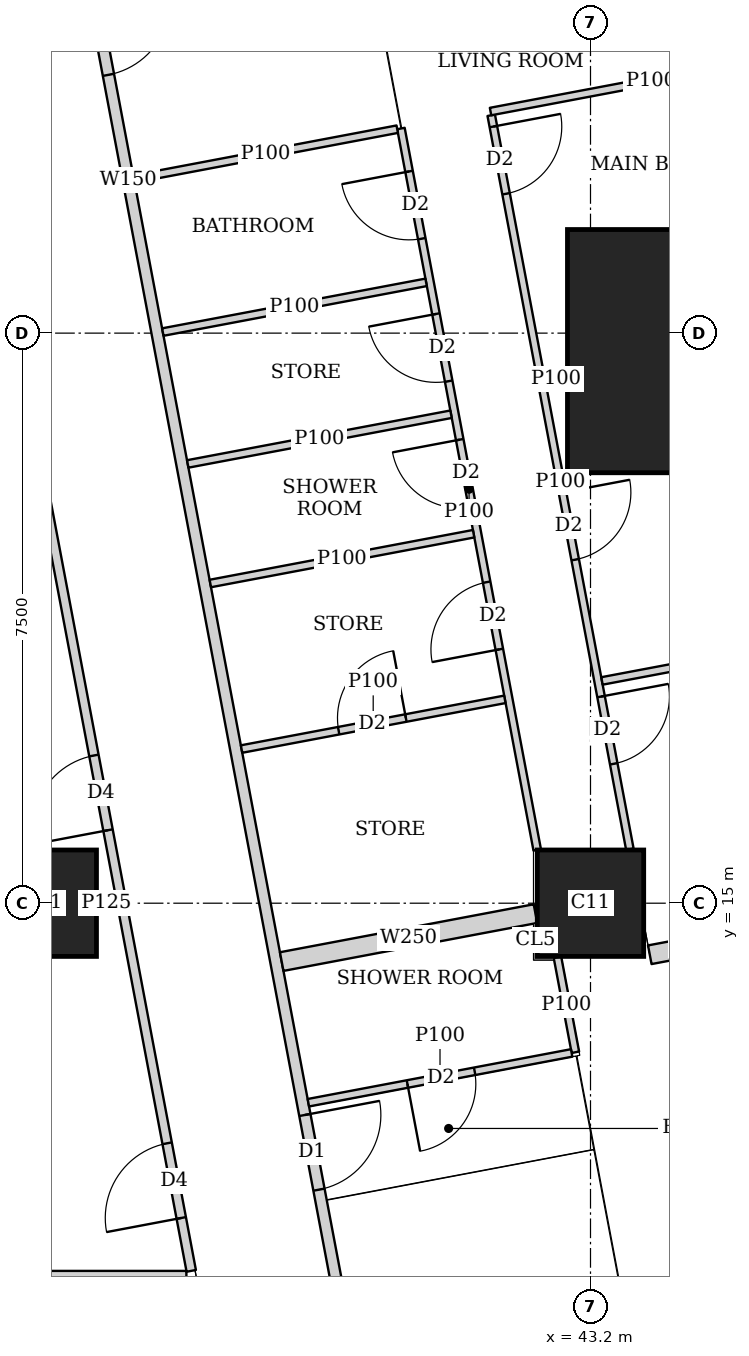
"""IFC4 building model, lengths in metres.
Left out: names, types, materials, properties, quantities, classifications, styles, units other than length and angle.
Written with IfcOpenShell. Run it as: python <this file> out.ifc"""

import sys

from ifc_helpers import new_model, si_unit, direction, frame, frame_2d, origin, origin_2d, place, context, subcontext, project, spatial, rectangle, extrude, element, fill, save


model = new_model("IFC4")
c1 = context("Model", 3, precision=1e-05, world=origin(), true_north=direction((0.0, 1.0)))
c2 = subcontext(c1, "Body", "Model", "MODEL_VIEW")
j1 = project(units=[si_unit("LENGTHUNIT", "METRE"), si_unit("PLANEANGLEUNIT", "RADIAN")], contexts=[c1])
p1 = place(None, origin())
s1 = spatial("IfcSite", under=j1, at=p1, CompositionType="ELEMENT")
p2 = place(p1, origin())
s2 = spatial("IfcBuilding", under=s1, at=p2, CompositionType="ELEMENT")
p3 = place(p2, frame((0.0, 0.0, 277.85)))
s3 = spatial("IfcBuildingStorey", under=s2, at=p3, CompositionType="ELEMENT", Elevation=277.85)
for number, where, z_axis, x_axis in (
    (1, (36.0, 15.0, 0.0), (0.0, 0.0, 1.0), (1.0, 0.0, 0.0)),
    (2, (43.2, 15.0, 0.0), (0.0, 0.0, 1.0), (1.0, 0.0, 0.0)),
):
    element("IfcColumn", number, at=place(p3, frame(where, z_axis=z_axis, x_axis=x_axis)), inside=s3, PredefinedType="COLUMN", context=c2, shape_type="SweptSolid", body=[
        extrude(rectangle(XDim=1.4, YDim=1.4, at=origin_2d()), origin(), (0.0, 0.0, 1.0), 3.75),
    ])
p4 = place(p3, frame((44.697, 22.263, 0.0), z_axis=(0.0, 0.0, 1.0), x_axis=(1.0, 0.0, 0.0)))
e3 = element("IfcColumn", 3, at=p4, inside=s3, PredefinedType="COLUMN", context=c2, shape_type="SweptSolid", body=[
    extrude(rectangle(XDim=3.6, YDim=3.2, at=origin_2d()), origin(), (0.0, 0.0, 1.0), 3.75),
])
p5 = place(p3, frame((49.684, 7.832, 0.0), z_axis=(0.0, 0.0, 1.0), x_axis=(-0.185616669694, 0.982622232565, 0.0)))
e4 = element("IfcWall", 4, at=p5, inside=s3, PredefinedType="SOLIDWALL", context=c2, shape_type="SweptSolid", body=[
    extrude(rectangle(XDim=36.0, YDim=0.2, at=frame_2d((18.0, 0.0))), origin(), (0.0, 0.0, 1.0), 3.5),
])
p6 = place(p5, frame((2.518, 0.0, 0.9)))
e5 = element("IfcOpeningElement", 5, at=p6, cuts=e4, PredefinedType="OPENING", context=c2, shape_type="SweptSolid", body=[
    extrude(rectangle(XDim=2.4, YDim=1.5, at=frame_2d((1.2, 0.75))), frame((0.0, 0.11, 0.0), z_axis=(0.0, -1.0, 0.0), x_axis=(1.0, 0.0, 0.0)), (0.0, 0.0, 1.0), 0.22),
])
p7 = place(p5, frame((8.444, 0.0, 0.9)))
e6 = element("IfcOpeningElement", 6, at=p7, cuts=e4, PredefinedType="OPENING", context=c2, shape_type="SweptSolid", body=[
    extrude(rectangle(XDim=1.8, YDim=1.5, at=frame_2d((0.9, 0.75))), frame((0.0, 0.11, 0.0), z_axis=(0.0, -1.0, 0.0), x_axis=(1.0, 0.0, 0.0)), (0.0, 0.0, 1.0), 0.22),
])
p8 = place(p5, frame((12.261, 0.0, 0.9)))
e7 = element("IfcOpeningElement", 7, at=p8, cuts=e4, PredefinedType="OPENING", context=c2, shape_type="SweptSolid", body=[
    extrude(rectangle(XDim=1.8, YDim=1.5, at=frame_2d((0.9, 0.75))), frame((0.0, 0.11, 0.0), z_axis=(0.0, -1.0, 0.0), x_axis=(1.0, 0.0, 0.0)), (0.0, 0.0, 1.0), 0.22),
])
p9 = place(p5, frame((16.078, 0.0, 0.9)))
e8 = element("IfcOpeningElement", 8, at=p9, cuts=e4, PredefinedType="OPENING", context=c2, shape_type="SweptSolid", body=[
    extrude(rectangle(XDim=1.8, YDim=1.5, at=frame_2d((0.9, 0.75))), frame((0.0, 0.11, 0.0), z_axis=(0.0, -1.0, 0.0), x_axis=(1.0, 0.0, 0.0)), (0.0, 0.0, 1.0), 0.22),
])
p10 = place(p5, frame((19.894, 0.0, 0.9)))
e9 = element("IfcOpeningElement", 9, at=p10, cuts=e4, PredefinedType="OPENING", context=c2, shape_type="SweptSolid", body=[
    extrude(rectangle(XDim=1.8, YDim=1.5, at=frame_2d((0.9, 0.75))), frame((0.0, 0.11, 0.0), z_axis=(0.0, -1.0, 0.0), x_axis=(1.0, 0.0, 0.0)), (0.0, 0.0, 1.0), 0.22),
])
p11 = place(p5, frame((23.71, 0.0, 0.9)))
e10 = element("IfcOpeningElement", 10, at=p11, cuts=e4, PredefinedType="OPENING", context=c2, shape_type="SweptSolid", body=[
    extrude(rectangle(XDim=1.8, YDim=1.5, at=frame_2d((0.9, 0.75))), frame((0.0, 0.11, 0.0), z_axis=(0.0, -1.0, 0.0), x_axis=(1.0, 0.0, 0.0)), (0.0, 0.0, 1.0), 0.22),
])
p12 = place(p5, frame((27.526, 0.0, 0.9)))
e11 = element("IfcOpeningElement", 11, at=p12, cuts=e4, PredefinedType="OPENING", context=c2, shape_type="SweptSolid", body=[
    extrude(rectangle(XDim=1.8, YDim=1.5, at=frame_2d((0.9, 0.75))), frame((0.0, 0.11, 0.0), z_axis=(0.0, -1.0, 0.0), x_axis=(1.0, 0.0, 0.0)), (0.0, 0.0, 1.0), 0.22),
])
p13 = place(p5, frame((32.046, 0.0, 0.9)))
e12 = element("IfcOpeningElement", 12, at=p13, cuts=e4, PredefinedType="OPENING", context=c2, shape_type="SweptSolid", body=[
    extrude(rectangle(XDim=1.8, YDim=1.5, at=frame_2d((0.9, 0.75))), frame((0.0, 0.11, 0.0), z_axis=(0.0, -1.0, 0.0), x_axis=(1.0, 0.0, 0.0)), (0.0, 0.0, 1.0), 0.22),
])
p14 = place(p3, frame((33.781, 42.186, 0.0), z_axis=(0.0, 0.0, 1.0), x_axis=(0.185593518645, -0.9826266055, 0.0)))
e13 = element("IfcWall", 13, at=p14, inside=s3, PredefinedType="SOLIDWALL", context=c2, shape_type="SweptSolid", body=[
    extrude(rectangle(XDim=35.961, YDim=0.15, at=frame_2d((17.98, 0.0))), origin(), (0.0, 0.0, 1.0), 2.5),
])
p15 = place(p14, frame((11.76, 0.0, 0.0)))
e14 = element("IfcOpeningElement", 14, at=p15, cuts=e13, PredefinedType="OPENING", context=c2, shape_type="SweptSolid", body=[
    extrude(rectangle(XDim=1.0, YDim=2.1, at=frame_2d((0.5, 1.05))), frame((0.0, 0.085, 0.0), z_axis=(0.0, -1.0, 0.0), x_axis=(1.0, 0.0, 0.0)), (0.0, 0.0, 1.0), 0.17),
])
p16 = place(p14, frame((15.576, 0.0, 0.0)))
e15 = element("IfcOpeningElement", 15, at=p16, cuts=e13, PredefinedType="OPENING", context=c2, shape_type="SweptSolid", body=[
    extrude(rectangle(XDim=1.0, YDim=2.1, at=frame_2d((0.5, 1.05))), frame((0.0, 0.085, 0.0), z_axis=(0.0, -1.0, 0.0), x_axis=(1.0, 0.0, 0.0)), (0.0, 0.0, 1.0), 0.17),
])
p17 = place(p14, frame((30.502, 0.0, 0.0)))
e16 = element("IfcOpeningElement", 16, at=p17, cuts=e13, PredefinedType="OPENING", context=c2, shape_type="SweptSolid", body=[
    extrude(rectangle(XDim=1.0, YDim=2.1, at=frame_2d((0.5, 1.05))), frame((0.0, 0.085, 0.0), z_axis=(0.0, -1.0, 0.0), x_axis=(1.0, 0.0, 0.0)), (0.0, 0.0, 1.0), 0.17),
])
p18 = place(p3, frame((41.894, 25.366, 0.0), z_axis=(0.0, 0.0, 1.0), x_axis=(0.185612905165, -0.982622943675, 0.0)))
e17 = element("IfcWall", 17, at=p18, inside=s3, PredefinedType="PARTITIONING", context=c2, shape_type="SweptSolid", body=[
    extrude(rectangle(XDim=9.827, YDim=0.1, at=frame_2d((4.913, 0.0))), origin(), (0.0, 0.0, 1.0), 2.5),
])
p19 = place(p18, frame((0.151, 0.0, 0.0)))
e18 = element("IfcOpeningElement", 18, at=p19, cuts=e17, PredefinedType="OPENING", context=c2, shape_type="SweptSolid", body=[
    extrude(rectangle(XDim=0.9, YDim=2.1, at=frame_2d((0.45, 1.05))), frame((0.0, 0.06, 0.0), z_axis=(0.0, -1.0, 0.0), x_axis=(1.0, 0.0, 0.0)), (0.0, 0.0, 1.0), 0.12),
])
p20 = place(p18, frame((5.05, 0.0, 0.0)))
e19 = element("IfcOpeningElement", 19, at=p20, cuts=e17, PredefinedType="OPENING", context=c2, shape_type="SweptSolid", body=[
    extrude(rectangle(XDim=0.9, YDim=2.1, at=frame_2d((0.45, 1.05))), frame((0.0, 0.06, 0.0), z_axis=(0.0, -1.0, 0.0), x_axis=(1.0, 0.0, 0.0)), (0.0, 0.0, 1.0), 0.12),
])
p21 = place(p18, frame((7.783, 0.0, 0.0)))
e20 = element("IfcOpeningElement", 20, at=p21, cuts=e17, PredefinedType="OPENING", context=c2, shape_type="SweptSolid", body=[
    extrude(rectangle(XDim=0.9, YDim=2.1, at=frame_2d((0.45, 1.05))), frame((0.0, 0.06, 0.0), z_axis=(0.0, -1.0, 0.0), x_axis=(1.0, 0.0, 0.0)), (0.0, 0.0, 1.0), 0.12),
])
p22 = place(p3, frame((40.706, 25.192, 0.0), z_axis=(0.0, 0.0, 1.0), x_axis=(0.185629824463, -0.982619747547, 0.0)))
e21 = element("IfcWall", 21, at=p22, inside=s3, PredefinedType="PARTITIONING", context=c2, shape_type="SweptSolid", body=[
    extrude(rectangle(XDim=9.659, YDim=0.1, at=frame_2d((4.83, 0.0))), origin(), (0.0, 0.0, 1.0), 2.5),
])
p23 = place(p22, frame((0.575, 0.0, 0.0)))
e22 = element("IfcOpeningElement", 22, at=p23, cuts=e21, PredefinedType="OPENING", context=c2, shape_type="SweptSolid", body=[
    extrude(rectangle(XDim=0.9, YDim=2.1, at=frame_2d((0.45, 1.05))), frame((0.0, 0.06, 0.0), z_axis=(0.0, -1.0, 0.0), x_axis=(1.0, 0.0, 0.0)), (0.0, 0.0, 1.0), 0.12),
])
p24 = place(p22, frame((4.166, 0.0, 0.0)))
e23 = element("IfcOpeningElement", 23, at=p24, cuts=e21, PredefinedType="OPENING", context=c2, shape_type="SweptSolid", body=[
    extrude(rectangle(XDim=0.9, YDim=2.1, at=frame_2d((0.45, 1.05))), frame((0.0, 0.06, 0.0), z_axis=(0.0, -1.0, 0.0), x_axis=(1.0, 0.0, 0.0)), (0.0, 0.0, 1.0), 0.12),
])
p25 = place(p22, frame((2.483, 0.0, 0.0)))
e24 = element("IfcOpeningElement", 24, at=p25, cuts=e21, PredefinedType="OPENING", context=c2, shape_type="SweptSolid", body=[
    extrude(rectangle(XDim=0.9, YDim=2.1, at=frame_2d((0.45, 1.05))), frame((0.0, 0.06, 0.0), z_axis=(0.0, -1.0, 0.0), x_axis=(1.0, 0.0, 0.0)), (0.0, 0.0, 1.0), 0.12),
])
p26 = place(p22, frame((6.074, 0.0, 0.0)))
e25 = element("IfcOpeningElement", 25, at=p26, cuts=e21, PredefinedType="OPENING", context=c2, shape_type="SweptSolid", body=[
    extrude(rectangle(XDim=0.9, YDim=2.1, at=frame_2d((0.45, 1.05))), frame((0.0, 0.06, 0.0), z_axis=(0.0, -1.0, 0.0), x_axis=(1.0, 0.0, 0.0)), (0.0, 0.0, 1.0), 0.12),
])
p27 = place(p3, frame((46.11, 26.213, 0.0), z_axis=(0.0, 0.0, 1.0), x_axis=(-0.982633535512, -0.185556823879, 0.0)))
e26 = element("IfcWall", 26, at=p27, inside=s3, PredefinedType="PARTITIONING", context=c2, shape_type="SweptSolid", body=[
    extrude(rectangle(XDim=4.3, YDim=0.1, at=frame_2d((2.15, 0.0))), origin(), (0.0, 0.0, 1.0), 2.5),
])
p28 = place(p3, frame((42.887, 21.921, 0.0), z_axis=(0.0, 0.0, 1.0), x_axis=(-0.982688058078, -0.185267861514, 0.0)))
e27 = element("IfcWall", 27, at=p28, inside=s3, PredefinedType="PARTITIONING", context=c2, shape_type="SweptSolid", body=[
    extrude(rectangle(XDim=0.286, YDim=0.1, at=frame_2d((0.143, 0.0))), origin(), (0.0, 0.0, 1.0), 2.5),
])
p29 = place(p3, frame((47.527, 18.712, 0.0), z_axis=(0.0, 0.0, 1.0), x_axis=(-0.982665405803, -0.185387972203, 0.0)))
e28 = element("IfcWall", 28, at=p29, inside=s3, PredefinedType="PARTITIONING", context=c2, shape_type="SweptSolid", body=[
    extrude(rectangle(XDim=4.25, YDim=0.1, at=frame_2d((2.125, 0.0))), origin(), (0.0, 0.0, 1.0), 2.5),
])
p30 = place(p3, frame((40.657, 25.183, 0.0), z_axis=(0.0, 0.0, 1.0), x_axis=(-0.982585626838, -0.185810349366, 0.0)))
e29 = element("IfcWall", 29, at=p30, inside=s3, PredefinedType="PARTITIONING", context=c2, shape_type="SweptSolid", body=[
    extrude(rectangle(XDim=3.525, YDim=0.1, at=frame_2d((1.763, 0.0))), origin(), (0.0, 0.0, 1.0), 3.5),
])
p31 = place(p3, frame((41.365, 21.433, 0.0), z_axis=(0.0, 0.0, 1.0), x_axis=(-0.982638553676, -0.185530247748, 0.0)))
e30 = element("IfcWall", 30, at=p31, inside=s3, PredefinedType="PARTITIONING", context=c2, shape_type="SweptSolid", body=[
    extrude(rectangle(XDim=3.525, YDim=0.1, at=frame_2d((1.763, 0.0))), origin(), (0.0, 0.0, 1.0), 3.5),
])
p32 = place(p3, frame((42.073, 17.682, 0.0), z_axis=(0.0, 0.0, 1.0), x_axis=(-0.98265117712, -0.185463376723, 0.0)))
e31 = element("IfcWall", 31, at=p32, inside=s3, PredefinedType="PARTITIONING", context=c2, shape_type="SweptSolid", body=[
    extrude(rectangle(XDim=3.525, YDim=0.1, at=frame_2d((1.763, 0.0))), origin(), (0.0, 0.0, 1.0), 3.5),
])
p33 = place(p32, frame((1.325, 0.0, 0.0)))
e32 = element("IfcOpeningElement", 32, at=p33, cuts=e31, PredefinedType="OPENING", context=c2, shape_type="SweptSolid", body=[
    extrude(rectangle(XDim=0.9, YDim=2.1, at=frame_2d((0.45, 1.05))), frame((0.0, 0.06, 0.0), z_axis=(0.0, -1.0, 0.0), x_axis=(1.0, 0.0, 0.0)), (0.0, 0.0, 1.0), 0.12),
])
p34 = place(p3, frame((41.037, 23.168, 0.0), z_axis=(0.0, 0.0, 1.0), x_axis=(-0.982638553676, -0.185530247748, 0.0)))
e33 = element("IfcWall", 33, at=p34, inside=s3, PredefinedType="PARTITIONING", context=c2, shape_type="SweptSolid", body=[
    extrude(rectangle(XDim=3.525, YDim=0.1, at=frame_2d((1.763, 0.0))), origin(), (0.0, 0.0, 1.0), 2.5),
])
p35 = place(p3, frame((41.662, 19.861, 0.0), z_axis=(0.0, 0.0, 1.0), x_axis=(-0.982588017646, -0.185797706064, 0.0)))
e34 = element("IfcWall", 34, at=p35, inside=s3, PredefinedType="PARTITIONING", context=c2, shape_type="SweptSolid", body=[
    extrude(rectangle(XDim=3.525, YDim=0.1, at=frame_2d((1.763, 0.0))), origin(), (0.0, 0.0, 1.0), 3.5),
])
p36 = place(p3, frame((42.765, 14.29, 0.0), z_axis=(0.0, 0.0, 1.0), x_axis=(0.185446293138, -0.982654401283, 0.0)))
e35 = element("IfcWall", 35, at=p36, inside=s3, PredefinedType="PARTITIONING", context=c2, shape_type="SweptSolid", body=[
    extrude(rectangle(XDim=1.273, YDim=0.1, at=frame_2d((0.636, 0.0))), origin(), (0.0, 0.0, 1.0), 3.5),
])
p37 = place(p3, frame((42.952, 13.03, 0.0), z_axis=(0.0, 0.0, 1.0), x_axis=(-0.982585626838, -0.185810349366, 0.0)))
e36 = element("IfcWall", 36, at=p37, inside=s3, PredefinedType="PARTITIONING", context=c2, shape_type="SweptSolid", body=[
    extrude(rectangle(XDim=3.525, YDim=0.1, at=frame_2d((1.763, 0.0))), origin(), (0.0, 0.0, 1.0), 3.5),
])
p38 = place(p37, frame((1.299, 0.0, 0.0)))
e37 = element("IfcOpeningElement", 37, at=p38, cuts=e36, PredefinedType="OPENING", context=c2, shape_type="SweptSolid", body=[
    extrude(rectangle(XDim=0.9, YDim=2.1, at=frame_2d((0.45, 1.05))), frame((0.0, 0.06, 0.0), z_axis=(0.0, -1.0, 0.0), x_axis=(1.0, 0.0, 0.0)), (0.0, 0.0, 1.0), 0.12),
])
p39 = place(p3, frame((45.29, 14.569, 0.0), z_axis=(0.0, 0.0, 1.0), x_axis=(-0.982676759201, -0.185327782391, 0.0)))
e38 = element("IfcWall", 38, at=p39, inside=s3, PredefinedType="SOLIDWALL", context=c2, shape_type="SweptSolid", body=[
    extrude(rectangle(XDim=1.333, YDim=0.25, at=frame_2d((0.667, 0.0))), origin(), (0.0, 0.0, 1.0), 3.5),
])
p40 = place(p3, frame((42.476, 14.863, 0.0), z_axis=(0.0, 0.0, 1.0), x_axis=(-0.982603567712, -0.185715450942, 0.0)))
e39 = element("IfcWall", 39, at=p40, inside=s3, PredefinedType="SOLIDWALL", context=c2, shape_type="SweptSolid", body=[
    extrude(rectangle(XDim=3.398, YDim=0.25, at=frame_2d((1.699, 0.0))), origin(), (0.0, 0.0, 1.0), 3.5),
])
p41 = place(p3, frame((28.95, 10.1, 0.0), z_axis=(0.0, 0.0, 1.0), x_axis=(1.0, 0.0, 0.0)))
e40 = element("IfcWall", 40, at=p41, inside=s3, PredefinedType="PARTITIONING", context=c2, shape_type="SweptSolid", body=[
    extrude(rectangle(XDim=8.933, YDim=0.125, at=frame_2d((4.467, 0.0))), origin(), (0.0, 0.0, 1.0), 3.5),
])
p42 = place(p3, frame((37.947, 10.163, 0.0), z_axis=(0.0, 0.0, 1.0), x_axis=(-0.185572770922, 0.982630523998, 0.0)))
e41 = element("IfcWall", 41, at=p42, inside=s3, PredefinedType="PARTITIONING", context=c2, shape_type="SweptSolid", body=[
    extrude(rectangle(XDim=25.111, YDim=0.125, at=frame_2d((12.556, 0.0))), origin(), (0.0, 0.0, 1.0), 2.5),
])
p43 = place(p42, frame((0.708, 0.0, 0.0)))
e42 = element("IfcOpeningElement", 42, at=p43, cuts=e41, PredefinedType="OPENING", context=c2, shape_type="SweptSolid", body=[
    extrude(rectangle(XDim=1.0, YDim=2.1, at=frame_2d((0.5, 1.05))), frame((0.0, 0.073, 0.0), z_axis=(0.0, -1.0, 0.0), x_axis=(1.0, 0.0, 0.0)), (0.0, 0.0, 1.0), 0.145),
])
p44 = place(p42, frame((5.9, 0.0, 0.0)))
e43 = element("IfcOpeningElement", 43, at=p44, cuts=e41, PredefinedType="OPENING", context=c2, shape_type="SweptSolid", body=[
    extrude(rectangle(XDim=1.0, YDim=2.1, at=frame_2d((0.5, 1.05))), frame((0.0, 0.073, 0.0), z_axis=(0.0, -1.0, 0.0), x_axis=(1.0, 0.0, 0.0)), (0.0, 0.0, 1.0), 0.145),
])
p45 = place(p42, frame((13.378, 0.0, 0.0)))
e44 = element("IfcOpeningElement", 44, at=p45, cuts=e41, PredefinedType="OPENING", context=c2, shape_type="SweptSolid", body=[
    extrude(rectangle(XDim=1.0, YDim=2.1, at=frame_2d((0.5, 1.05))), frame((0.0, 0.073, 0.0), z_axis=(0.0, -1.0, 0.0), x_axis=(1.0, 0.0, 0.0)), (0.0, 0.0, 1.0), 0.145),
])
p46 = place(p42, frame((21.15, 0.0, 0.0)))
e45 = element("IfcOpeningElement", 45, at=p46, cuts=e41, PredefinedType="OPENING", context=c2, shape_type="SweptSolid", body=[
    extrude(rectangle(XDim=1.0, YDim=2.1, at=frame_2d((0.5, 1.05))), frame((0.0, 0.073, 0.0), z_axis=(0.0, -1.0, 0.0), x_axis=(1.0, 0.0, 0.0)), (0.0, 0.0, 1.0), 0.145),
])
p47 = place(p3, frame((36.701, 15.0, 0.0), z_axis=(0.0, 0.0, 1.0), x_axis=(1.0, 0.0, 0.0)))
e46 = element("IfcWall", 46, at=p47, inside=s3, PredefinedType="PARTITIONING", context=c2, shape_type="SweptSolid", body=[
    extrude(rectangle(XDim=0.257, YDim=0.125, at=frame_2d((0.128, 0.0))), origin(), (0.0, 0.0, 1.0), 3.5),
])
p48 = place(p19, origin())
e47 = element("IfcDoor", 47, at=p48, inside=s3, OperationType="SINGLE_SWING_LEFT", PredefinedType="DOOR", context=c2, shape_type="SweptSolid", body=[
    extrude(rectangle(XDim=0.9, YDim=2.1, at=frame_2d((0.45, 1.05))), frame((0.0, 0.025, 0.0), z_axis=(0.0, -1.0, 0.0), x_axis=(1.0, 0.0, 0.0)), (0.0, 0.0, 1.0), 0.05),
])
fill(e18, e47)
p49 = place(p20, origin())
e48 = element("IfcDoor", 48, at=p49, inside=s3, OperationType="SINGLE_SWING_LEFT", PredefinedType="DOOR", context=c2, shape_type="SweptSolid", body=[
    extrude(rectangle(XDim=0.9, YDim=2.1, at=frame_2d((0.45, 1.05))), frame((0.0, 0.025, 0.0), z_axis=(0.0, -1.0, 0.0), x_axis=(1.0, 0.0, 0.0)), (0.0, 0.0, 1.0), 0.05),
])
fill(e19, e48)
p50 = place(p21, origin())
e49 = element("IfcDoor", 49, at=p50, inside=s3, OperationType="SINGLE_SWING_LEFT", PredefinedType="DOOR", context=c2, shape_type="SweptSolid", body=[
    extrude(rectangle(XDim=0.9, YDim=2.1, at=frame_2d((0.45, 1.05))), frame((0.0, 0.025, 0.0), z_axis=(0.0, -1.0, 0.0), x_axis=(1.0, 0.0, 0.0)), (0.0, 0.0, 1.0), 0.05),
])
fill(e20, e49)
p51 = place(p23, origin())
e50 = element("IfcDoor", 50, at=p51, inside=s3, OperationType="SINGLE_SWING_RIGHT", PredefinedType="DOOR", context=c2, shape_type="SweptSolid", body=[
    extrude(rectangle(XDim=0.9, YDim=2.1, at=frame_2d((0.45, 1.05))), frame((0.0, 0.025, 0.0), z_axis=(0.0, -1.0, 0.0), x_axis=(1.0, 0.0, 0.0)), (0.0, 0.0, 1.0), 0.05),
])
fill(e22, e50)
p52 = place(p24, origin())
e51 = element("IfcDoor", 51, at=p52, inside=s3, OperationType="SINGLE_SWING_RIGHT", PredefinedType="DOOR", context=c2, shape_type="SweptSolid", body=[
    extrude(rectangle(XDim=0.9, YDim=2.1, at=frame_2d((0.45, 1.05))), frame((0.0, 0.025, 0.0), z_axis=(0.0, -1.0, 0.0), x_axis=(1.0, 0.0, 0.0)), (0.0, 0.0, 1.0), 0.05),
])
fill(e23, e51)
p53 = place(p25, origin())
e52 = element("IfcDoor", 52, at=p53, inside=s3, OperationType="SINGLE_SWING_RIGHT", PredefinedType="DOOR", context=c2, shape_type="SweptSolid", body=[
    extrude(rectangle(XDim=0.9, YDim=2.1, at=frame_2d((0.45, 1.05))), frame((0.0, 0.025, 0.0), z_axis=(0.0, -1.0, 0.0), x_axis=(1.0, 0.0, 0.0)), (0.0, 0.0, 1.0), 0.05),
])
fill(e24, e52)
p54 = place(p26, origin())
e53 = element("IfcDoor", 53, at=p54, inside=s3, OperationType="SINGLE_SWING_LEFT", PredefinedType="DOOR", context=c2, shape_type="SweptSolid", body=[
    extrude(rectangle(XDim=0.9, YDim=2.1, at=frame_2d((0.45, 1.05))), frame((0.0, 0.025, 0.0), z_axis=(0.0, -1.0, 0.0), x_axis=(1.0, 0.0, 0.0)), (0.0, 0.0, 1.0), 0.05),
])
fill(e25, e53)
p55 = place(p16, origin())
e54 = element("IfcDoor", 54, at=p55, inside=s3, OperationType="SINGLE_SWING_LEFT", PredefinedType="DOOR", context=c2, shape_type="SweptSolid", body=[
    extrude(rectangle(XDim=1.0, YDim=2.1, at=frame_2d((0.5, 1.05))), frame((0.0, 0.025, 0.0), z_axis=(0.0, -1.0, 0.0), x_axis=(1.0, 0.0, 0.0)), (0.0, 0.0, 1.0), 0.05),
])
fill(e15, e54)
p56 = place(p38, origin())
e55 = element("IfcDoor", 55, at=p56, inside=s3, OperationType="SINGLE_SWING_RIGHT", PredefinedType="DOOR", context=c2, shape_type="SweptSolid", body=[
    extrude(rectangle(XDim=0.9, YDim=2.1, at=frame_2d((0.45, 1.05))), frame((0.0, 0.025, 0.0), z_axis=(0.0, -1.0, 0.0), x_axis=(1.0, 0.0, 0.0)), (0.0, 0.0, 1.0), 0.05),
])
fill(e37, e55)
p57 = place(p17, origin())
e56 = element("IfcDoor", 56, at=p57, inside=s3, OperationType="SINGLE_SWING_LEFT", PredefinedType="DOOR", context=c2, shape_type="SweptSolid", body=[
    extrude(rectangle(XDim=1.0, YDim=2.1, at=frame_2d((0.5, 1.05))), frame((0.0, 0.025, 0.0), z_axis=(0.0, -1.0, 0.0), x_axis=(1.0, 0.0, 0.0)), (0.0, 0.0, 1.0), 0.05),
])
fill(e16, e56)
p58 = place(p33, origin())
e57 = element("IfcDoor", 57, at=p58, inside=s3, OperationType="SINGLE_SWING_RIGHT", PredefinedType="DOOR", context=c2, shape_type="SweptSolid", body=[
    extrude(rectangle(XDim=0.9, YDim=2.1, at=frame_2d((0.45, 1.05))), frame((0.0, 0.025, 0.0), z_axis=(0.0, -1.0, 0.0), x_axis=(1.0, 0.0, 0.0)), (0.0, 0.0, 1.0), 0.05),
])
fill(e32, e57)
p59 = place(p43, origin())
e58 = element("IfcDoor", 58, at=p59, inside=s3, OperationType="SINGLE_SWING_LEFT", PredefinedType="DOOR", context=c2, shape_type="SweptSolid", body=[
    extrude(rectangle(XDim=1.0, YDim=2.1, at=frame_2d((0.5, 1.05))), frame((0.0, 0.025, 0.0), z_axis=(0.0, -1.0, 0.0), x_axis=(1.0, 0.0, 0.0)), (0.0, 0.0, 1.0), 0.05),
])
fill(e42, e58)
p60 = place(p44, origin())
e59 = element("IfcDoor", 59, at=p60, inside=s3, OperationType="SINGLE_SWING_LEFT", PredefinedType="DOOR", context=c2, shape_type="SweptSolid", body=[
    extrude(rectangle(XDim=1.0, YDim=2.1, at=frame_2d((0.5, 1.05))), frame((0.0, 0.025, 0.0), z_axis=(0.0, -1.0, 0.0), x_axis=(1.0, 0.0, 0.0)), (0.0, 0.0, 1.0), 0.05),
])
fill(e43, e59)
save(model, sys.argv[1])
